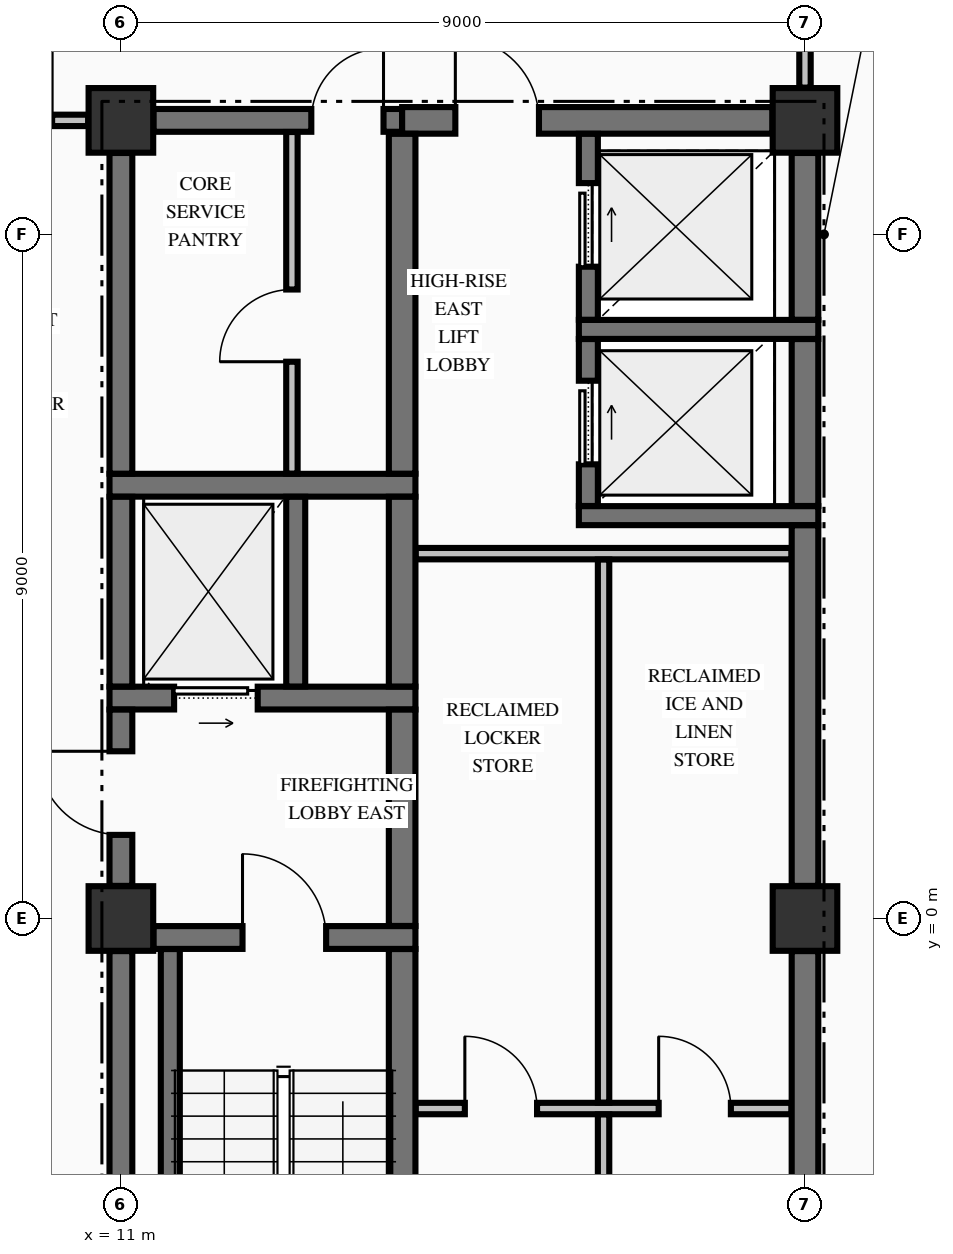
"""IFC4 building model, lengths in metres.
Left out: names, types, materials, properties, quantities, classifications, styles, units other than length and angle.
Written with IfcOpenShell. Run it as: python <this file> out.ifc"""

import sys

from ifc_helpers import new_model, si_unit, direction, frame, frame_2d, origin, origin_2d, place, context, subcontext, project, spatial, rectangle, extrude, element, fill, save


model = new_model("IFC4")
c1 = context("Model", 3, precision=1e-05, world=origin(), true_north=direction((0.0, 1.0)))
c2 = subcontext(c1, "Body", "Model", "MODEL_VIEW")
j1 = project(units=[si_unit("LENGTHUNIT", "METRE"), si_unit("PLANEANGLEUNIT", "RADIAN")], contexts=[c1])
p1 = place(None, origin())
s1 = spatial("IfcSite", under=j1, at=p1, CompositionType="ELEMENT")
p2 = place(p1, origin())
s2 = spatial("IfcBuilding", under=s1, at=p2, CompositionType="ELEMENT")
p3 = place(p2, frame((0.0, 0.0, 201.66)))
s3 = spatial("IfcBuildingStorey", under=s2, at=p3, CompositionType="ELEMENT", Elevation=201.66)
for number, where, z_axis, x_axis in (
    (1, (11.0, 0.0, -0.25), (0.0, 0.0, 1.0), (1.0, 0.0, 0.0)),
    (2, (11.0, 10.5, -0.25), (0.0, 0.0, 1.0), (1.0, 0.0, 0.0)),
    (3, (20.0, 10.5, -0.25), (0.0, 0.0, 1.0), (1.0, 0.0, 0.0)),
    (4, (20.0, 0.0, -0.25), (0.0, 0.0, 1.0), (1.0, 0.0, 0.0)),
):
    element("IfcColumn", number, at=place(p3, frame(where, z_axis=z_axis, x_axis=x_axis)), inside=s3, PredefinedType="COLUMN", context=c2, shape_type="SweptSolid", body=[
        extrude(rectangle(XDim=0.85, YDim=0.85, at=origin_2d()), origin(), (0.0, 0.0, 1.0), 3.4),
    ])
p4 = place(p3, frame((11.429, -0.25, 0.0), z_axis=(0.0, 0.0, 1.0), x_axis=(1.0, 0.0, 0.0)))
e5 = element("IfcWall", 5, at=p4, inside=s3, PredefinedType="SHEAR", context=c2, shape_type="SweptSolid", body=[
    extrude(rectangle(XDim=3.446, YDim=0.3, at=frame_2d((1.723, 0.0))), origin(), (0.0, 0.0, 1.0), 3.15),
])
p5 = place(p4, frame((1.171, 0.0, 0.0)))
e6 = element("IfcOpeningElement", 6, at=p5, cuts=e5, PredefinedType="OPENING", context=c2, shape_type="SweptSolid", body=[
    extrude(rectangle(XDim=1.1, YDim=2.15, at=frame_2d((0.55, 1.075))), frame((0.0, 0.16, 0.0), z_axis=(0.0, -1.0, 0.0), x_axis=(1.0, 0.0, 0.0)), (0.0, 0.0, 1.0), 0.32),
])
p6 = place(p3, frame((10.85, 2.9, 0.0), z_axis=(0.0, 0.0, 1.0), x_axis=(1.0, 0.0, 0.0)))
e7 = element("IfcWall", 7, at=p6, inside=s3, PredefinedType="SHEAR", context=c2, shape_type="SweptSolid", body=[
    extrude(rectangle(XDim=4.025, YDim=0.3, at=frame_2d((2.012, 0.0))), origin(), (0.0, 0.0, 1.0), 3.15),
])
p7 = place(p6, frame((0.85, 0.0, 0.0)))
e8 = element("IfcOpeningElement", 8, at=p7, cuts=e7, PredefinedType="OPENING", context=c2, shape_type="SweptSolid", body=[
    extrude(rectangle(XDim=1.1, YDim=2.2, at=frame_2d((0.55, 1.1))), frame((0.0, 0.16, 0.0), z_axis=(0.0, -1.0, 0.0), x_axis=(1.0, 0.0, 0.0)), (0.0, 0.0, 1.0), 0.32),
])
p8 = place(p3, frame((17.025, 5.3, 0.0), z_axis=(0.0, 0.0, 1.0), x_axis=(1.0, 0.0, 0.0)))
e9 = element("IfcWall", 9, at=p8, inside=s3, PredefinedType="SOLIDWALL", context=c2, shape_type="SweptSolid", body=[
    extrude(rectangle(XDim=3.15, YDim=0.25, at=frame_2d((1.575, 0.0))), origin(), (0.0, 0.0, 1.0), 3.15),
])
p9 = place(p3, frame((10.85, 5.7, 0.0), z_axis=(0.0, 0.0, 1.0), x_axis=(1.0, 0.0, 0.0)))
e10 = element("IfcWall", 10, at=p9, inside=s3, PredefinedType="SHEAR", context=c2, shape_type="SweptSolid", body=[
    extrude(rectangle(XDim=4.025, YDim=0.3, at=frame_2d((2.012, 0.0))), origin(), (0.0, 0.0, 1.0), 3.15),
])
p10 = place(p3, frame((17.025, 7.75, 0.0), z_axis=(0.0, 0.0, 1.0), x_axis=(1.0, 0.0, 0.0)))
e11 = element("IfcWall", 11, at=p10, inside=s3, PredefinedType="SOLIDWALL", context=c2, shape_type="SweptSolid", body=[
    extrude(rectangle(XDim=3.15, YDim=0.25, at=frame_2d((1.575, 0.0))), origin(), (0.0, 0.0, 1.0), 3.15),
])
p11 = place(p3, frame((11.429, 10.5, 0.0), z_axis=(0.0, 0.0, 1.0), x_axis=(1.0, 0.0, 0.0)))
e12 = element("IfcWall", 12, at=p11, inside=s3, PredefinedType="SHEAR", context=c2, shape_type="SweptSolid", body=[
    extrude(rectangle(XDim=3.271, YDim=0.3, at=frame_2d((1.635, 0.0))), origin(), (0.0, 0.0, 1.0), 3.15),
])
p12 = place(p11, frame((2.076, 0.0, 0.0)))
e13 = element("IfcOpeningElement", 13, at=p12, cuts=e12, PredefinedType="OPENING", context=c2, shape_type="SweptSolid", body=[
    extrude(rectangle(XDim=0.95, YDim=2.15, at=frame_2d((0.475, 1.075))), frame((0.0, 0.16, 0.0), z_axis=(0.0, -1.0, 0.0), x_axis=(1.0, 0.0, 0.0)), (0.0, 0.0, 1.0), 0.32),
])
p13 = place(p3, frame((14.7, 10.5, 0.0), z_axis=(0.0, 0.0, 1.0), x_axis=(1.0, 0.0, 0.0)))
e14 = element("IfcWall", 14, at=p13, inside=s3, PredefinedType="SHEAR", context=c2, shape_type="SweptSolid", body=[
    extrude(rectangle(XDim=4.871, YDim=0.35, at=frame_2d((2.436, 0.0))), origin(), (0.0, 0.0, 1.0), 3.15),
])
p14 = place(p13, frame((0.7, 0.0, 0.0)))
e15 = element("IfcOpeningElement", 15, at=p14, cuts=e14, PredefinedType="OPENING", context=c2, shape_type="SweptSolid", body=[
    extrude(rectangle(XDim=1.1, YDim=2.15, at=frame_2d((0.55, 1.075))), frame((0.0, 0.185, 0.0), z_axis=(0.0, -1.0, 0.0), x_axis=(1.0, 0.0, 0.0)), (0.0, 0.0, 1.0), 0.37),
])
p15 = place(p3, frame((14.878, -2.5, 0.0), z_axis=(0.0, 0.0, 1.0), x_axis=(1.0, 0.0, 0.0)))
e16 = element("IfcWall", 16, at=p15, inside=s3, PredefinedType="PARTITIONING", context=c2, shape_type="SweptSolid", body=[
    extrude(rectangle(XDim=4.944, YDim=0.15, at=frame_2d((2.472, 0.0))), origin(), (0.0, 0.0, 1.0), 3.15),
])
p16 = place(p15, frame((0.647, 0.0, 0.0)))
e17 = element("IfcOpeningElement", 17, at=p16, cuts=e16, PredefinedType="OPENING", context=c2, shape_type="SweptSolid", body=[
    extrude(rectangle(XDim=0.95, YDim=2.15, at=frame_2d((0.475, 1.075))), frame((0.0, 0.085, 0.0), z_axis=(0.0, -1.0, 0.0), x_axis=(1.0, 0.0, 0.0)), (0.0, 0.0, 1.0), 0.17),
])
p17 = place(p15, frame((3.197, 0.0, 0.0)))
e18 = element("IfcOpeningElement", 18, at=p17, cuts=e16, PredefinedType="OPENING", context=c2, shape_type="SweptSolid", body=[
    extrude(rectangle(XDim=0.95, YDim=2.15, at=frame_2d((0.475, 1.075))), frame((0.0, 0.085, 0.0), z_axis=(0.0, -1.0, 0.0), x_axis=(1.0, 0.0, 0.0)), (0.0, 0.0, 1.0), 0.17),
])
p18 = place(p3, frame((14.878, 4.8, 0.0), z_axis=(0.0, 0.0, 1.0), x_axis=(1.0, 0.0, 0.0)))
e19 = element("IfcWall", 19, at=p18, inside=s3, PredefinedType="PARTITIONING", context=c2, shape_type="SweptSolid", body=[
    extrude(rectangle(XDim=4.944, YDim=0.15, at=frame_2d((2.472, 0.0))), origin(), (0.0, 0.0, 1.0), 3.15),
])
p19 = place(p3, frame((-10.569, 10.5, 0.0), z_axis=(0.0, 0.0, 1.0), x_axis=(1.0, 0.0, 0.0)))
e20 = element("IfcWall", 20, at=p19, inside=s3, PredefinedType="PARTITIONING", context=c2, shape_type="SweptSolid", body=[
    extrude(rectangle(XDim=21.138, YDim=0.15, at=frame_2d((10.569, 0.0))), origin(), (0.0, 0.0, 1.0), 3.15),
])
p20 = place(p19, frame((0.474, 0.0, 0.0)))
e21 = element("IfcOpeningElement", 21, at=p20, cuts=e20, PredefinedType="OPENING", context=c2, shape_type="SweptSolid", body=[
    extrude(rectangle(XDim=1.05, YDim=2.15, at=frame_2d((0.525, 1.075))), frame((0.0, 0.085, 0.0), z_axis=(0.0, -1.0, 0.0), x_axis=(1.0, 0.0, 0.0)), (0.0, 0.0, 1.0), 0.17),
])
p21 = place(p19, frame((19.614, 0.0, 0.0)))
e22 = element("IfcOpeningElement", 22, at=p21, cuts=e20, PredefinedType="OPENING", context=c2, shape_type="SweptSolid", body=[
    extrude(rectangle(XDim=1.05, YDim=2.15, at=frame_2d((0.525, 1.075))), frame((0.0, 0.085, 0.0), z_axis=(0.0, -1.0, 0.0), x_axis=(1.0, 0.0, 0.0)), (0.0, 0.0, 1.0), 0.17),
])
p22 = place(p3, frame((11.0, -9.521, 0.0), z_axis=(0.0, 0.0, 1.0), x_axis=(0.0, 1.0, 0.0)))
e23 = element("IfcWall", 23, at=p22, inside=s3, PredefinedType="SHEAR", context=c2, shape_type="SweptSolid", body=[
    extrude(rectangle(XDim=9.092, YDim=0.3, at=frame_2d((4.546, 0.0))), origin(), (0.0, 0.0, 1.0), 3.15),
])
p23 = place(p3, frame((11.0, 0.429, 0.0), z_axis=(0.0, 0.0, 1.0), x_axis=(0.0, 1.0, 0.0)))
e24 = element("IfcWall", 24, at=p23, inside=s3, PredefinedType="SHEAR", context=c2, shape_type="SweptSolid", body=[
    extrude(rectangle(XDim=2.319, YDim=0.3, at=frame_2d((1.16, 0.0))), origin(), (0.0, 0.0, 1.0), 3.15),
])
p24 = place(p23, frame((0.671, 0.0, 0.0)))
e25 = element("IfcOpeningElement", 25, at=p24, cuts=e24, PredefinedType="OPENING", context=c2, shape_type="SweptSolid", body=[
    extrude(rectangle(XDim=1.1, YDim=2.15, at=frame_2d((0.55, 1.075))), frame((0.0, 0.16, 0.0), z_axis=(0.0, -1.0, 0.0), x_axis=(1.0, 0.0, 0.0)), (0.0, 0.0, 1.0), 0.32),
])
p25 = place(p3, frame((11.0, 3.052, 0.0), z_axis=(0.0, 0.0, 1.0), x_axis=(0.0, 1.0, 0.0)))
e26 = element("IfcWall", 26, at=p25, inside=s3, PredefinedType="SHEAR", context=c2, shape_type="SweptSolid", body=[
    extrude(rectangle(XDim=2.496, YDim=0.3, at=frame_2d((1.248, 0.0))), origin(), (0.0, 0.0, 1.0), 3.15),
])
p26 = place(p3, frame((11.0, 5.852, 0.0), z_axis=(0.0, 0.0, 1.0), x_axis=(0.0, 1.0, 0.0)))
e27 = element("IfcWall", 27, at=p26, inside=s3, PredefinedType="SHEAR", context=c2, shape_type="SweptSolid", body=[
    extrude(rectangle(XDim=4.219, YDim=0.3, at=frame_2d((2.109, 0.0))), origin(), (0.0, 0.0, 1.0), 3.15),
])
p27 = place(p3, frame((11.65, -9.798, 0.0), z_axis=(0.0, 0.0, 1.0), x_axis=(0.0, 1.0, 0.0)))
e28 = element("IfcWall", 28, at=p27, inside=s3, PredefinedType="SOLIDWALL", context=c2, shape_type="SweptSolid", body=[
    extrude(rectangle(XDim=9.396, YDim=0.25, at=frame_2d((4.698, 0.0))), origin(), (0.0, 0.0, 1.0), 3.15),
])
p28 = place(p3, frame((13.3, 3.052, 0.0), z_axis=(0.0, 0.0, 1.0), x_axis=(0.0, 1.0, 0.0)))
e29 = element("IfcWall", 29, at=p28, inside=s3, PredefinedType="SOLIDWALL", context=c2, shape_type="SweptSolid", body=[
    extrude(rectangle(XDim=2.496, YDim=0.25, at=frame_2d((1.248, 0.0))), origin(), (0.0, 0.0, 1.0), 3.15),
])
p29 = place(p3, frame((14.7, -9.773, 0.0), z_axis=(0.0, 0.0, 1.0), x_axis=(0.0, 1.0, 0.0)))
e30 = element("IfcWall", 30, at=p29, inside=s3, PredefinedType="SHEAR", context=c2, shape_type="SweptSolid", body=[
    extrude(rectangle(XDim=9.371, YDim=0.35, at=frame_2d((4.686, 0.0))), origin(), (0.0, 0.0, 1.0), 3.15),
])
p30 = place(p3, frame((14.7, -0.098, 0.0), z_axis=(0.0, 0.0, 1.0), x_axis=(0.0, 1.0, 0.0)))
e31 = element("IfcWall", 31, at=p30, inside=s3, PredefinedType="SHEAR", context=c2, shape_type="SweptSolid", body=[
    extrude(rectangle(XDim=2.846, YDim=0.35, at=frame_2d((1.423, 0.0))), origin(), (0.0, 0.0, 1.0), 3.15),
])
p31 = place(p3, frame((14.7, 3.052, 0.0), z_axis=(0.0, 0.0, 1.0), x_axis=(0.0, 1.0, 0.0)))
e32 = element("IfcWall", 32, at=p31, inside=s3, PredefinedType="SHEAR", context=c2, shape_type="SweptSolid", body=[
    extrude(rectangle(XDim=2.496, YDim=0.35, at=frame_2d((1.248, 0.0))), origin(), (0.0, 0.0, 1.0), 3.15),
])
p32 = place(p3, frame((14.7, 5.852, 0.0), z_axis=(0.0, 0.0, 1.0), x_axis=(0.0, 1.0, 0.0)))
e33 = element("IfcWall", 33, at=p32, inside=s3, PredefinedType="SHEAR", context=c2, shape_type="SweptSolid", body=[
    extrude(rectangle(XDim=4.471, YDim=0.35, at=frame_2d((2.235, 0.0))), origin(), (0.0, 0.0, 1.0), 3.15),
])
p33 = place(p3, frame((17.15, 5.427, 0.0), z_axis=(0.0, 0.0, 1.0), x_axis=(0.0, 1.0, 0.0)))
e34 = element("IfcWall", 34, at=p33, inside=s3, PredefinedType="SOLIDWALL", context=c2, shape_type="SweptSolid", body=[
    extrude(rectangle(XDim=2.196, YDim=0.25, at=frame_2d((1.098, 0.0))), origin(), (0.0, 0.0, 1.0), 3.15),
])
p34 = place(p33, frame((0.548, 0.0, 0.0)))
e35 = element("IfcOpeningElement", 35, at=p34, cuts=e34, PredefinedType="OPENING", context=c2, shape_type="SweptSolid", body=[
    extrude(rectangle(XDim=1.1, YDim=2.2, at=frame_2d((0.55, 1.1))), frame((0.0, 0.135, 0.0), z_axis=(0.0, -1.0, 0.0), x_axis=(1.0, 0.0, 0.0)), (0.0, 0.0, 1.0), 0.27),
])
p35 = place(p3, frame((17.15, 7.877, 0.0), z_axis=(0.0, 0.0, 1.0), x_axis=(0.0, 1.0, 0.0)))
e36 = element("IfcWall", 36, at=p35, inside=s3, PredefinedType="SOLIDWALL", context=c2, shape_type="SweptSolid", body=[
    extrude(rectangle(XDim=2.446, YDim=0.25, at=frame_2d((1.223, 0.0))), origin(), (0.0, 0.0, 1.0), 3.15),
])
p36 = place(p35, frame((0.698, 0.0, 0.0)))
e37 = element("IfcOpeningElement", 37, at=p36, cuts=e36, PredefinedType="OPENING", context=c2, shape_type="SweptSolid", body=[
    extrude(rectangle(XDim=1.1, YDim=2.2, at=frame_2d((0.55, 1.1))), frame((0.0, 0.135, 0.0), z_axis=(0.0, -1.0, 0.0), x_axis=(1.0, 0.0, 0.0)), (0.0, 0.0, 1.0), 0.27),
])
p37 = place(p3, frame((20.0, -9.521, 0.0), z_axis=(0.0, 0.0, 1.0), x_axis=(0.0, 1.0, 0.0)))
e38 = element("IfcWall", 38, at=p37, inside=s3, PredefinedType="SHEAR", context=c2, shape_type="SweptSolid", body=[
    extrude(rectangle(XDim=9.092, YDim=0.35, at=frame_2d((4.546, 0.0))), origin(), (0.0, 0.0, 1.0), 3.15),
])
p38 = place(p3, frame((20.0, 0.429, 0.0), z_axis=(0.0, 0.0, 1.0), x_axis=(0.0, 1.0, 0.0)))
e39 = element("IfcWall", 39, at=p38, inside=s3, PredefinedType="SHEAR", context=c2, shape_type="SweptSolid", body=[
    extrude(rectangle(XDim=4.744, YDim=0.35, at=frame_2d((2.372, 0.0))), origin(), (0.0, 0.0, 1.0), 3.15),
])
p39 = place(p3, frame((20.0, 5.427, 0.0), z_axis=(0.0, 0.0, 1.0), x_axis=(0.0, 1.0, 0.0)))
e40 = element("IfcWall", 40, at=p39, inside=s3, PredefinedType="SHEAR", context=c2, shape_type="SweptSolid", body=[
    extrude(rectangle(XDim=2.196, YDim=0.35, at=frame_2d((1.098, 0.0))), origin(), (0.0, 0.0, 1.0), 3.15),
])
p40 = place(p3, frame((20.0, 7.877, 0.0), z_axis=(0.0, 0.0, 1.0), x_axis=(0.0, 1.0, 0.0)))
e41 = element("IfcWall", 41, at=p40, inside=s3, PredefinedType="SHEAR", context=c2, shape_type="SweptSolid", body=[
    extrude(rectangle(XDim=2.194, YDim=0.35, at=frame_2d((1.097, 0.0))), origin(), (0.0, 0.0, 1.0), 3.15),
])
p41 = place(p3, frame((13.25, 5.853, 0.0), z_axis=(0.0, 0.0, 1.0), x_axis=(0.0, 1.0, 0.0)))
e42 = element("IfcWall", 42, at=p41, inside=s3, PredefinedType="PARTITIONING", context=c2, shape_type="SweptSolid", body=[
    extrude(rectangle(XDim=4.494, YDim=0.15, at=frame_2d((2.247, 0.0))), origin(), (0.0, 0.0, 1.0), 3.15),
])
p42 = place(p41, frame((1.472, 0.0, 0.0)))
e43 = element("IfcOpeningElement", 43, at=p42, cuts=e42, PredefinedType="OPENING", context=c2, shape_type="SweptSolid", body=[
    extrude(rectangle(XDim=0.95, YDim=2.15, at=frame_2d((0.475, 1.075))), frame((0.0, 0.085, 0.0), z_axis=(0.0, -1.0, 0.0), x_axis=(1.0, 0.0, 0.0)), (0.0, 0.0, 1.0), 0.17),
])
p43 = place(p3, frame((17.35, -9.772, 0.0), z_axis=(0.0, 0.0, 1.0), x_axis=(0.0, 1.0, 0.0)))
e44 = element("IfcWall", 44, at=p43, inside=s3, PredefinedType="PARTITIONING", context=c2, shape_type="SweptSolid", body=[
    extrude(rectangle(XDim=7.194, YDim=0.15, at=frame_2d((3.597, 0.0))), origin(), (0.0, 0.0, 1.0), 3.15),
])
p44 = place(p3, frame((17.35, -2.422, 0.0), z_axis=(0.0, 0.0, 1.0), x_axis=(0.0, 1.0, 0.0)))
e45 = element("IfcWall", 45, at=p44, inside=s3, PredefinedType="PARTITIONING", context=c2, shape_type="SweptSolid", body=[
    extrude(rectangle(XDim=7.144, YDim=0.15, at=frame_2d((3.572, 0.0))), origin(), (0.0, 0.0, 1.0), 3.15),
])
p45 = place(p3, frame((20.0, 10.931, 0.0), z_axis=(0.0, 0.0, 1.0), x_axis=(0.0, 1.0, 0.0)))
e46 = element("IfcWall", 46, at=p45, inside=s3, PredefinedType="PARTITIONING", context=c2, shape_type="SweptSolid", body=[
    extrude(rectangle(XDim=1.941, YDim=0.15, at=frame_2d((0.971, 0.0))), origin(), (0.0, 0.0, 1.0), 2.342),
])
p46 = place(p5, origin())
e47 = element("IfcDoor", 47, at=p46, inside=s3, OperationType="SINGLE_SWING_LEFT", PredefinedType="DOOR", context=c2, shape_type="SweptSolid", body=[
    extrude(rectangle(XDim=1.1, YDim=2.15, at=frame_2d((0.55, 1.075))), frame((0.0, 0.025, 0.0), z_axis=(0.0, -1.0, 0.0), x_axis=(1.0, 0.0, 0.0)), (0.0, 0.0, 1.0), 0.05),
])
fill(e6, e47)
p47 = place(p24, origin())
e48 = element("IfcDoor", 48, at=p47, inside=s3, OperationType="SINGLE_SWING_RIGHT", PredefinedType="DOOR", context=c2, shape_type="SweptSolid", body=[
    extrude(rectangle(XDim=1.1, YDim=2.15, at=frame_2d((0.55, 1.075))), frame((0.0, 0.025, 0.0), z_axis=(0.0, -1.0, 0.0), x_axis=(1.0, 0.0, 0.0)), (0.0, 0.0, 1.0), 0.05),
])
fill(e25, e48)
p48 = place(p7, origin())
e49 = element("IfcDoor", 49, at=p48, inside=s3, OperationType="SLIDING_TO_RIGHT", PredefinedType="DOOR", context=c2, shape_type="SweptSolid", body=[
    extrude(rectangle(XDim=1.1, YDim=2.2, at=frame_2d((0.55, 1.1))), frame((0.0, 0.025, 0.0), z_axis=(0.0, -1.0, 0.0), x_axis=(1.0, 0.0, 0.0)), (0.0, 0.0, 1.0), 0.05),
])
fill(e8, e49)
p49 = place(p12, origin())
e50 = element("IfcDoor", 50, at=p49, inside=s3, OperationType="SINGLE_SWING_RIGHT", PredefinedType="DOOR", context=c2, shape_type="SweptSolid", body=[
    extrude(rectangle(XDim=0.95, YDim=2.15, at=frame_2d((0.475, 1.075))), frame((0.0, 0.025, 0.0), z_axis=(0.0, -1.0, 0.0), x_axis=(1.0, 0.0, 0.0)), (0.0, 0.0, 1.0), 0.05),
])
fill(e13, e50)
p50 = place(p42, origin())
e51 = element("IfcDoor", 51, at=p50, inside=s3, OperationType="SINGLE_SWING_LEFT", PredefinedType="DOOR", context=c2, shape_type="SweptSolid", body=[
    extrude(rectangle(XDim=0.95, YDim=2.15, at=frame_2d((0.475, 1.075))), frame((0.0, 0.025, 0.0), z_axis=(0.0, -1.0, 0.0), x_axis=(1.0, 0.0, 0.0)), (0.0, 0.0, 1.0), 0.05),
])
fill(e43, e51)
p51 = place(p34, origin())
e52 = element("IfcDoor", 52, at=p51, inside=s3, OperationType="SLIDING_TO_RIGHT", PredefinedType="DOOR", context=c2, shape_type="SweptSolid", body=[
    extrude(rectangle(XDim=1.1, YDim=2.2, at=frame_2d((0.55, 1.1))), frame((0.0, 0.025, 0.0), z_axis=(0.0, -1.0, 0.0), x_axis=(1.0, 0.0, 0.0)), (0.0, 0.0, 1.0), 0.05),
])
fill(e35, e52)
p52 = place(p36, origin())
e53 = element("IfcDoor", 53, at=p52, inside=s3, OperationType="SLIDING_TO_RIGHT", PredefinedType="DOOR", context=c2, shape_type="SweptSolid", body=[
    extrude(rectangle(XDim=1.1, YDim=2.2, at=frame_2d((0.55, 1.1))), frame((0.0, 0.025, 0.0), z_axis=(0.0, -1.0, 0.0), x_axis=(1.0, 0.0, 0.0)), (0.0, 0.0, 1.0), 0.05),
])
fill(e37, e53)
p53 = place(p14, origin())
e54 = element("IfcDoor", 54, at=p53, inside=s3, OperationType="SINGLE_SWING_LEFT", PredefinedType="DOOR", context=c2, shape_type="SweptSolid", body=[
    extrude(rectangle(XDim=1.1, YDim=2.15, at=frame_2d((0.55, 1.075))), frame((0.0, 0.025, 0.0), z_axis=(0.0, -1.0, 0.0), x_axis=(1.0, 0.0, 0.0)), (0.0, 0.0, 1.0), 0.05),
])
fill(e15, e54)
p54 = place(p16, origin())
e55 = element("IfcDoor", 55, at=p54, inside=s3, OperationType="SINGLE_SWING_LEFT", PredefinedType="DOOR", context=c2, shape_type="SweptSolid", body=[
    extrude(rectangle(XDim=0.95, YDim=2.15, at=frame_2d((0.475, 1.075))), frame((0.0, 0.025, 0.0), z_axis=(0.0, -1.0, 0.0), x_axis=(1.0, 0.0, 0.0)), (0.0, 0.0, 1.0), 0.05),
])
fill(e17, e55)
p55 = place(p17, origin())
e56 = element("IfcDoor", 56, at=p55, inside=s3, OperationType="SINGLE_SWING_LEFT", PredefinedType="DOOR", context=c2, shape_type="SweptSolid", body=[
    extrude(rectangle(XDim=0.95, YDim=2.15, at=frame_2d((0.475, 1.075))), frame((0.0, 0.025, 0.0), z_axis=(0.0, -1.0, 0.0), x_axis=(1.0, 0.0, 0.0)), (0.0, 0.0, 1.0), 0.05),
])
fill(e18, e56)
save(model, sys.argv[1])
